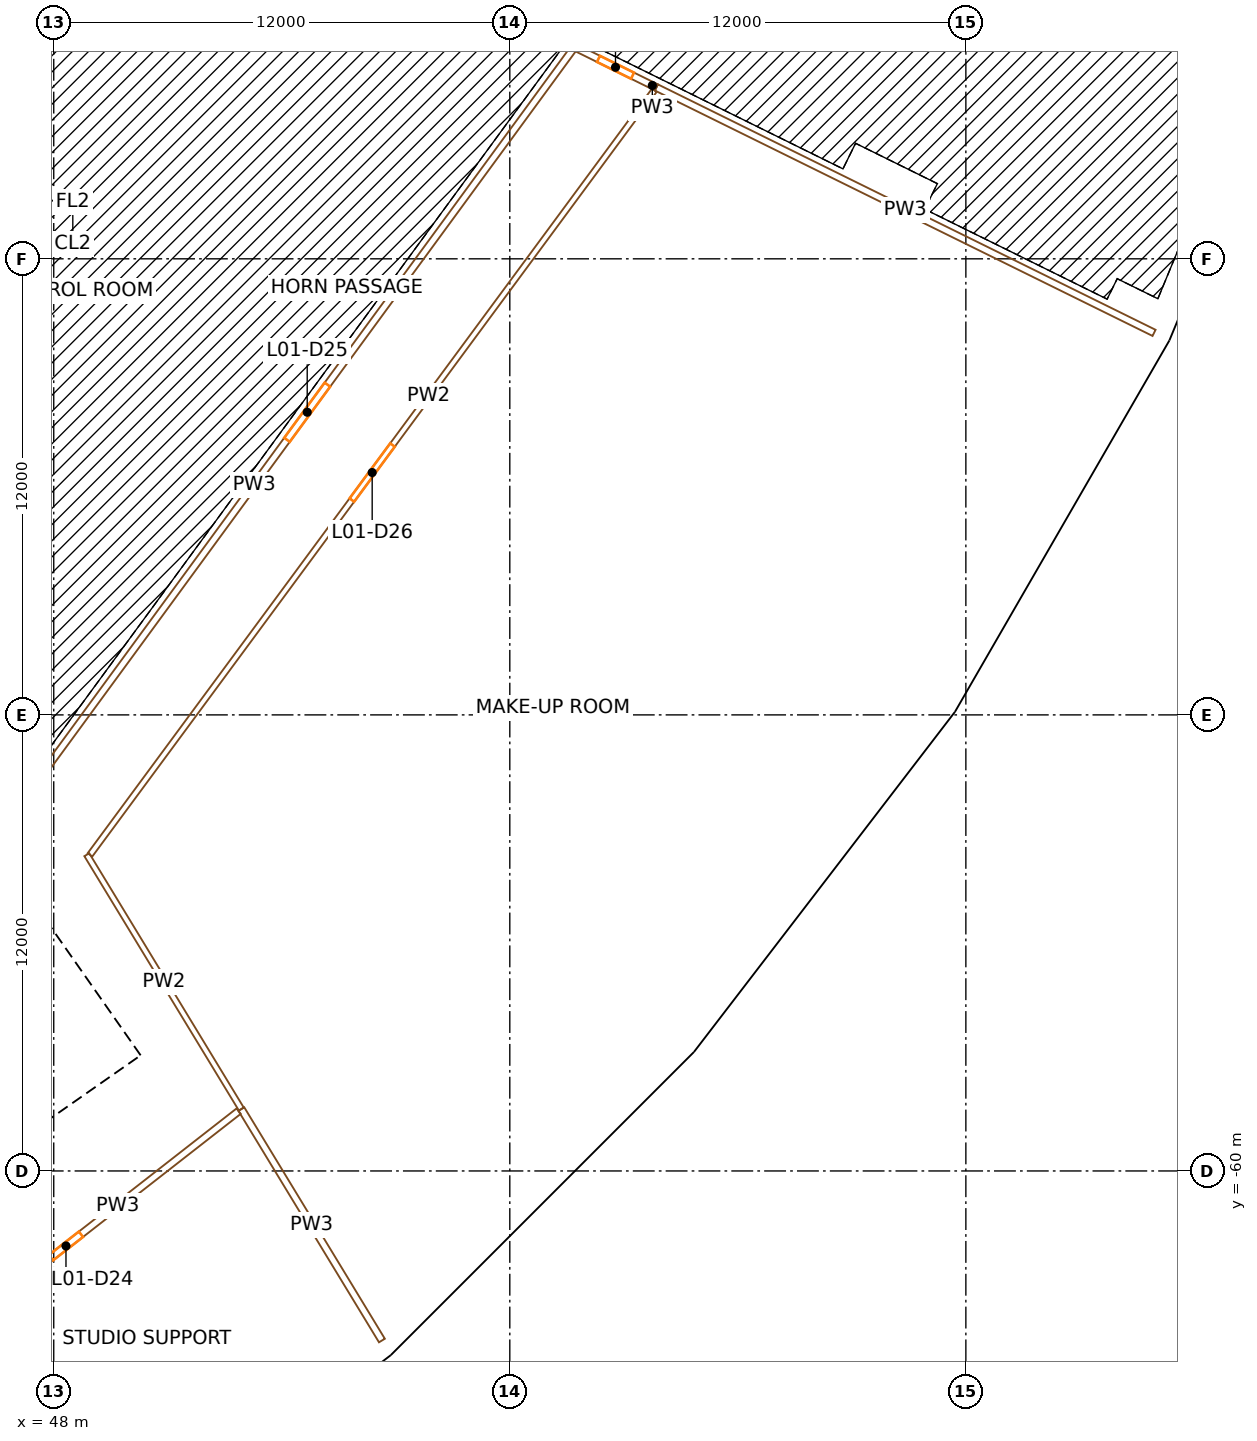
"""IFC4 building model, lengths in metres.
Left out: names, types, materials, properties, quantities, classifications, styles, units other than length and angle.
Written with IfcOpenShell. Run it as: python <this file> out.ifc"""

import sys

from ifc_helpers import new_model, si_unit, direction, frame, frame_2d, origin, origin_2d, place, context, subcontext, project, spatial, rectangle, extrude, element, fill, save


model = new_model("IFC4")
c1 = context("Model", 3, precision=1e-05, world=origin(), true_north=direction((0.0, 1.0)))
c2 = subcontext(c1, "Body", "Model", "MODEL_VIEW")
j1 = project(units=[si_unit("LENGTHUNIT", "METRE"), si_unit("PLANEANGLEUNIT", "RADIAN")], contexts=[c1])
p1 = place(None, origin())
s1 = spatial("IfcSite", under=j1, at=p1, CompositionType="ELEMENT")
p2 = place(p1, origin())
s2 = spatial("IfcBuilding", under=s1, at=p2, CompositionType="ELEMENT")
p3 = place(p2, frame((0.0, 0.0, 9.0)))
s3 = spatial("IfcBuildingStorey", under=s2, at=p3, CompositionType="ELEMENT", Elevation=9.0)
p4 = place(p3, frame((51.264, -58.456, 0.0), z_axis=(0.0, 0.0, 1.0), x_axis=(0.751839807479, 0.6593458151, 0.0)))
e1 = element("IfcColumn", 1, at=p4, inside=s3, PredefinedType="COLUMN", context=c2, shape_type="SweptSolid", body=[
    extrude(rectangle(XDim=1.4, YDim=1.8, at=origin_2d()), origin(), (0.0, 0.0, 1.0), 9.0),
])
p5 = place(p3, frame((56.209, -64.094, 0.0), z_axis=(0.0, 0.0, 1.0), x_axis=(0.751839807479, 0.6593458151, 0.0)))
e2 = element("IfcColumn", 2, at=p5, inside=s3, PredefinedType="COLUMN", context=c2, shape_type="SweptSolid", body=[
    extrude(rectangle(XDim=1.1, YDim=1.3, at=origin_2d()), origin(), (0.0, 0.0, 1.0), 9.0),
])
p6 = place(p3, frame((58.456, -51.264, 0.0), z_axis=(0.0, 0.0, 1.0), x_axis=(0.6593458151, 0.751839807479, 0.0)))
e3 = element("IfcColumn", 3, at=p6, inside=s3, PredefinedType="COLUMN", context=c2, shape_type="SweptSolid", body=[
    extrude(rectangle(XDim=1.4, YDim=1.8, at=origin_2d()), origin(), (0.0, 0.0, 1.0), 9.0),
])
p7 = place(p3, frame((64.094, -56.209, 0.0), z_axis=(0.0, 0.0, 1.0), x_axis=(0.6593458151, 0.751839807479, 0.0)))
e4 = element("IfcColumn", 4, at=p7, inside=s3, PredefinedType="COLUMN", context=c2, shape_type="SweptSolid", body=[
    extrude(rectangle(XDim=1.1, YDim=1.3, at=origin_2d()), origin(), (0.0, 0.0, 1.0), 9.0),
])
for number, where, z_axis, x_axis in (
    (5, (48.433, -32.362, 0.0), (0.0, 0.0, 1.0), (0.556, 0.831, 0.0)),
    (6, (64.647, -43.196, 0.0), (0.0, 0.0, 1.0), (0.556, 0.831, 0.0)),
):
    element("IfcColumn", number, at=place(p3, frame(where, z_axis=z_axis, x_axis=x_axis)), inside=s3, PredefinedType="COLUMN", context=c2, shape_type="SweptSolid", body=[
        extrude(rectangle(XDim=1.4, YDim=1.8, at=origin_2d()), origin(), (0.0, 0.0, 1.0), 9.0),
    ])
p8 = place(p3, frame((70.883, -47.362, 0.0), z_axis=(0.0, 0.0, 1.0), x_axis=(0.55557023302, 0.831469612303, 0.0)))
e7 = element("IfcColumn", 7, at=p8, inside=s3, PredefinedType="COLUMN", context=c2, shape_type="SweptSolid", body=[
    extrude(rectangle(XDim=1.1, YDim=1.3, at=origin_2d()), origin(), (0.0, 0.0, 1.0), 9.0),
])
p9 = place(p3, frame((69.732, -34.388, 0.0), z_axis=(0.0, 0.0, 1.0), x_axis=(0.442288690219, 0.896872741533, 0.0)))
e8 = element("IfcColumn", 8, at=p9, inside=s3, PredefinedType="COLUMN", context=c2, shape_type="SweptSolid", body=[
    extrude(rectangle(XDim=1.4, YDim=1.8, at=origin_2d()), origin(), (0.0, 0.0, 1.0), 9.0),
])
p10 = place(p3, frame((76.458, -37.705, 0.0), z_axis=(0.0, 0.0, 1.0), x_axis=(0.442288690219, 0.896872741533, 0.0)))
e9 = element("IfcColumn", 9, at=p10, inside=s3, PredefinedType="COLUMN", context=c2, shape_type="SweptSolid", body=[
    extrude(rectangle(XDim=1.1, YDim=1.3, at=origin_2d()), origin(), (0.0, 0.0, 1.0), 9.0),
])
p11 = place(p3, frame((49.779, -57.191, 0.0), z_axis=(0.0, 0.0, 1.0), x_axis=(-0.573577477574, 0.819151315216, 0.0)))
e10 = element("IfcWall", 10, at=p11, inside=s3, PredefinedType="SHEAR", context=c2, shape_type="SweptSolid", body=[
    extrude(rectangle(XDim=14.8, YDim=0.9, at=frame_2d((7.4, 0.0))), origin(), (0.0, 0.0, 1.0), 8.6),
])
p12 = place(p11, frame((6.7, 0.0, 0.0)))
e11 = element("IfcOpeningElement", 11, at=p12, cuts=e10, PredefinedType="OPENING", context=c2, shape_type="SweptSolid", body=[
    extrude(rectangle(XDim=1.4, YDim=2.1, at=frame_2d((0.7, 1.05))), frame((0.0, 0.46, 0.0), z_axis=(0.0, -1.0, 0.0), x_axis=(1.0, 0.0, 0.0)), (0.0, 0.0, 1.0), 0.92),
])
p13 = place(p3, frame((36.827, -65.71, 0.0), z_axis=(0.0, 0.0, 1.0), x_axis=(0.819153391756, 0.573574511963, 0.0)))
e12 = element("IfcWall", 12, at=p13, inside=s3, PredefinedType="SHEAR", context=c2, shape_type="SweptSolid", body=[
    extrude(rectangle(XDim=15.045, YDim=0.9, at=frame_2d((7.523, 0.0))), origin(), (0.0, 0.0, 1.0), 8.6),
])
p14 = place(p13, frame((0.8, 0.0, 0.0)))
e13 = element("IfcOpeningElement", 13, at=p14, cuts=e12, PredefinedType="OPENING", context=c2, shape_type="SweptSolid", body=[
    extrude(rectangle(XDim=1.0, YDim=2.1, at=frame_2d((0.5, 1.05))), frame((0.0, 0.46, 0.0), z_axis=(0.0, -1.0, 0.0), x_axis=(1.0, 0.0, 0.0)), (0.0, 0.0, 1.0), 0.92),
])
p15 = place(p13, frame((3.475, 0.0, 0.0)))
e14 = element("IfcOpeningElement", 14, at=p15, cuts=e12, PredefinedType="OPENING", context=c2, shape_type="SweptSolid", body=[
    extrude(rectangle(XDim=1.0, YDim=2.1, at=frame_2d((0.5, 1.05))), frame((0.0, 0.46, 0.0), z_axis=(0.0, -1.0, 0.0), x_axis=(1.0, 0.0, 0.0)), (0.0, 0.0, 1.0), 0.92),
])
p16 = place(p13, frame((6.175, 0.0, 0.0)))
e15 = element("IfcOpeningElement", 15, at=p16, cuts=e12, PredefinedType="OPENING", context=c2, shape_type="SweptSolid", body=[
    extrude(rectangle(XDim=1.0, YDim=2.1, at=frame_2d((0.5, 1.05))), frame((0.0, 0.46, 0.0), z_axis=(0.0, -1.0, 0.0), x_axis=(1.0, 0.0, 0.0)), (0.0, 0.0, 1.0), 0.92),
])
p17 = place(p13, frame((13.495, 0.0, 0.0)))
e16 = element("IfcOpeningElement", 16, at=p17, cuts=e12, PredefinedType="OPENING", context=c2, shape_type="SweptSolid", body=[
    extrude(rectangle(XDim=1.1, YDim=2.1, at=frame_2d((0.55, 1.05))), frame((0.0, 0.46, 0.0), z_axis=(0.0, -1.0, 0.0), x_axis=(1.0, 0.0, 0.0)), (0.0, 0.0, 1.0), 0.92),
])
p18 = place(p3, frame((47.839, -71.491, 0.0), z_axis=(0.0, 0.0, 1.0), x_axis=(0.793355377778, 0.608758773695, 0.0)))
e17 = element("IfcWall", 17, at=p18, inside=s3, PredefinedType="SOLIDWALL", context=c2, shape_type="SweptSolid", body=[
    extrude(rectangle(XDim=11.135, YDim=0.45, at=frame_2d((5.567, 0.0))), origin(), (0.0, 0.0, 1.0), 7.7),
])
p19 = place(p3, frame((56.699, -64.698, 0.0), z_axis=(0.0, 0.0, 1.0), x_axis=(0.707106781187, 0.707106781187, 0.0)))
e18 = element("IfcWall", 18, at=p19, inside=s3, PredefinedType="SOLIDWALL", context=c2, shape_type="SweptSolid", body=[
    extrude(rectangle(XDim=11.312, YDim=0.45, at=frame_2d((5.656, 0.0))), origin(), (0.0, 0.0, 1.0), 7.7),
])
p20 = place(p3, frame((64.713, -56.673, 0.0), z_axis=(0.0, 0.0, 1.0), x_axis=(0.608758773695, 0.793355377778, 0.0)))
e19 = element("IfcWall", 19, at=p20, inside=s3, PredefinedType="SOLIDWALL", context=c2, shape_type="SweptSolid", body=[
    extrude(rectangle(XDim=11.135, YDim=0.45, at=frame_2d((5.567, 0.0))), origin(), (0.0, 0.0, 1.0), 7.7),
])
p21 = place(p3, frame((71.512, -47.819, 0.0), z_axis=(0.0, 0.0, 1.0), x_axis=(0.500001430823, 0.866024577697, 0.0)))
e20 = element("IfcWall", 20, at=p21, inside=s3, PredefinedType="SOLIDWALL", context=c2, shape_type="SweptSolid", body=[
    extrude(rectangle(XDim=11.312, YDim=0.45, at=frame_2d((5.656, 0.0))), origin(), (0.0, 0.0, 1.0), 7.7),
])
p22 = place(p3, frame((77.176, -37.993, 0.0), z_axis=(0.0, 0.0, 1.0), x_axis=(0.382700611107, 0.923872416656, 0.0)))
e21 = element("IfcWall", 21, at=p22, inside=s3, PredefinedType="SOLIDWALL", context=c2, shape_type="SweptSolid", body=[
    extrude(rectangle(XDim=11.168, YDim=0.45, at=frame_2d((5.584, 0.0))), origin(), (0.0, 0.0, 1.0), 7.7),
])
p23 = place(p3, frame((52.865, -58.427, 0.0), z_axis=(0.0, 0.0, 1.0), x_axis=(-0.788252635542, -0.615351755146, 0.0)))
e22 = element("IfcWall", 22, at=p23, inside=s3, PredefinedType="PARTITIONING", context=c2, shape_type="SweptSolid", body=[
    extrude(rectangle(XDim=11.526, YDim=0.18, at=frame_2d((5.763, 0.0))), origin(), (0.0, 0.0, 1.0), 7.6),
])
p24 = place(p23, frame((5.263, 0.0, 0.0)))
e23 = element("IfcOpeningElement", 23, at=p24, cuts=e22, PredefinedType="OPENING", context=c2, shape_type="SweptSolid", body=[
    extrude(rectangle(XDim=1.0, YDim=2.1, at=frame_2d((0.5, 1.05))), frame((0.0, 0.1, 0.0), z_axis=(0.0, -1.0, 0.0), x_axis=(1.0, 0.0, 0.0)), (0.0, 0.0, 1.0), 0.2),
])
p25 = place(p3, frame((47.687, -49.571, 0.0), z_axis=(0.0, 0.0, 1.0), x_axis=(0.590834674168, 0.806792654776, 0.0)))
e24 = element("IfcWall", 24, at=p25, inside=s3, PredefinedType="PARTITIONING", context=c2, shape_type="SweptSolid", body=[
    extrude(rectangle(XDim=23.635, YDim=0.18, at=frame_2d((11.818, 0.0))), origin(), (0.0, 0.0, 1.0), 7.6),
])
p26 = place(p25, frame((10.918, 0.0, 0.0)))
e25 = element("IfcOpeningElement", 25, at=p26, cuts=e24, PredefinedType="OPENING", context=c2, shape_type="SweptSolid", body=[
    extrude(rectangle(XDim=1.8, YDim=2.1, at=frame_2d((0.9, 1.05))), frame((0.0, 0.1, 0.0), z_axis=(0.0, -1.0, 0.0), x_axis=(1.0, 0.0, 0.0)), (0.0, 0.0, 1.0), 0.2),
])
p27 = place(p3, frame((48.87, -51.679, 0.0), z_axis=(0.0, 0.0, 1.0), x_axis=(0.519169312849, -0.854671413232, 0.0)))
e26 = element("IfcWall", 26, at=p27, inside=s3, PredefinedType="PARTITIONING", context=c2, shape_type="SweptSolid", body=[
    extrude(rectangle(XDim=7.831, YDim=0.15, at=frame_2d((3.915, 0.0))), origin(), (0.0, 0.0, 1.0), 7.6),
])
p28 = place(p3, frame((63.804, -31.563, 0.0), z_axis=(0.0, 0.0, 1.0), x_axis=(-0.593865237906, -0.804564527683, 0.0)))
e27 = element("IfcWall", 27, at=p28, inside=s3, PredefinedType="PARTITIONING", context=c2, shape_type="SweptSolid", body=[
    extrude(rectangle(XDim=25.006, YDim=0.15, at=frame_2d((12.503, 0.0))), origin(), (0.0, 0.0, 1.0), 7.6),
])
p29 = place(p28, frame((11.603, 0.0, 0.0)))
e28 = element("IfcOpeningElement", 28, at=p29, cuts=e27, PredefinedType="OPENING", context=c2, shape_type="SweptSolid", body=[
    extrude(rectangle(XDim=1.8, YDim=2.1, at=frame_2d((0.9, 1.05))), frame((0.0, 0.085, 0.0), z_axis=(0.0, -1.0, 0.0), x_axis=(1.0, 0.0, 0.0)), (0.0, 0.0, 1.0), 0.17),
])
p30 = place(p3, frame((52.936, -58.372, 0.0), z_axis=(0.0, 0.0, 1.0), x_axis=(0.519148894699, -0.854683815883, 0.0)))
e29 = element("IfcWall", 29, at=p30, inside=s3, PredefinedType="PARTITIONING", context=c2, shape_type="SweptSolid", body=[
    extrude(rectangle(XDim=7.125, YDim=0.18, at=frame_2d((3.563, 0.0))), origin(), (0.0, 0.0, 1.0), 7.6),
])
p31 = place(p3, frame((61.705, -30.429, 0.0), z_axis=(0.0, 0.0, 1.0), x_axis=(0.896875292523, -0.442283517284, 0.0)))
e30 = element("IfcWall", 30, at=p31, inside=s3, PredefinedType="PARTITIONING", context=c2, shape_type="SweptSolid", body=[
    extrude(rectangle(XDim=2.4, YDim=0.18, at=frame_2d((1.2, 0.0))), origin(), (0.0, 0.0, 1.0), 7.6),
])
p32 = place(p31, frame((0.7, 0.0, 0.0)))
e31 = element("IfcOpeningElement", 31, at=p32, cuts=e30, PredefinedType="OPENING", context=c2, shape_type="SweptSolid", body=[
    extrude(rectangle(XDim=1.0, YDim=2.1, at=frame_2d((0.5, 1.05))), frame((0.0, 0.1, 0.0), z_axis=(0.0, -1.0, 0.0), x_axis=(1.0, 0.0, 0.0)), (0.0, 0.0, 1.0), 0.2),
])
p33 = place(p3, frame((76.952, -37.948, 0.0), z_axis=(0.0, 0.0, 1.0), x_axis=(-0.896868508028, 0.442297274813, 0.0)))
e32 = element("IfcWall", 32, at=p33, inside=s3, PredefinedType="PARTITIONING", context=c2, shape_type="SweptSolid", body=[
    extrude(rectangle(XDim=14.6, YDim=0.18, at=frame_2d((7.3, 0.0))), origin(), (0.0, 0.0, 1.0), 7.6),
])
p34 = place(p17, origin())
e33 = element("IfcDoor", 33, at=p34, inside=s3, OperationType="SINGLE_SWING_LEFT", PredefinedType="DOOR", context=c2, shape_type="SweptSolid", body=[
    extrude(rectangle(XDim=1.1, YDim=2.1, at=frame_2d((0.55, 1.05))), frame((0.0, 0.025, 0.0), z_axis=(0.0, -1.0, 0.0), x_axis=(1.0, 0.0, 0.0)), (0.0, 0.0, 1.0), 0.05),
])
fill(e16, e33)
p35 = place(p24, origin())
e34 = element("IfcDoor", 34, at=p35, inside=s3, OperationType="SINGLE_SWING_RIGHT", PredefinedType="DOOR", context=c2, shape_type="SweptSolid", body=[
    extrude(rectangle(XDim=1.0, YDim=2.1, at=frame_2d((0.5, 1.05))), frame((0.0, 0.025, 0.0), z_axis=(0.0, -1.0, 0.0), x_axis=(1.0, 0.0, 0.0)), (0.0, 0.0, 1.0), 0.05),
])
fill(e23, e34)
p36 = place(p26, origin())
e35 = element("IfcDoor", 35, at=p36, inside=s3, OperationType="DOUBLE_DOOR_SINGLE_SWING", PredefinedType="DOOR", context=c2, shape_type="SweptSolid", body=[
    extrude(rectangle(XDim=1.8, YDim=2.1, at=frame_2d((0.9, 1.05))), frame((0.0, 0.025, 0.0), z_axis=(0.0, -1.0, 0.0), x_axis=(1.0, 0.0, 0.0)), (0.0, 0.0, 1.0), 0.05),
])
fill(e25, e35)
p37 = place(p29, origin())
e36 = element("IfcDoor", 36, at=p37, inside=s3, OperationType="DOUBLE_DOOR_SINGLE_SWING", PredefinedType="DOOR", context=c2, shape_type="SweptSolid", body=[
    extrude(rectangle(XDim=1.8, YDim=2.1, at=frame_2d((0.9, 1.05))), frame((0.0, 0.025, 0.0), z_axis=(0.0, -1.0, 0.0), x_axis=(1.0, 0.0, 0.0)), (0.0, 0.0, 1.0), 0.05),
])
fill(e28, e36)
p38 = place(p32, origin())
e37 = element("IfcDoor", 37, at=p38, inside=s3, OperationType="SINGLE_SWING_RIGHT", PredefinedType="DOOR", context=c2, shape_type="SweptSolid", body=[
    extrude(rectangle(XDim=1.0, YDim=2.1, at=frame_2d((0.5, 1.05))), frame((0.0, 0.025, 0.0), z_axis=(0.0, -1.0, 0.0), x_axis=(1.0, 0.0, 0.0)), (0.0, 0.0, 1.0), 0.05),
])
fill(e31, e37)
save(model, sys.argv[1])
